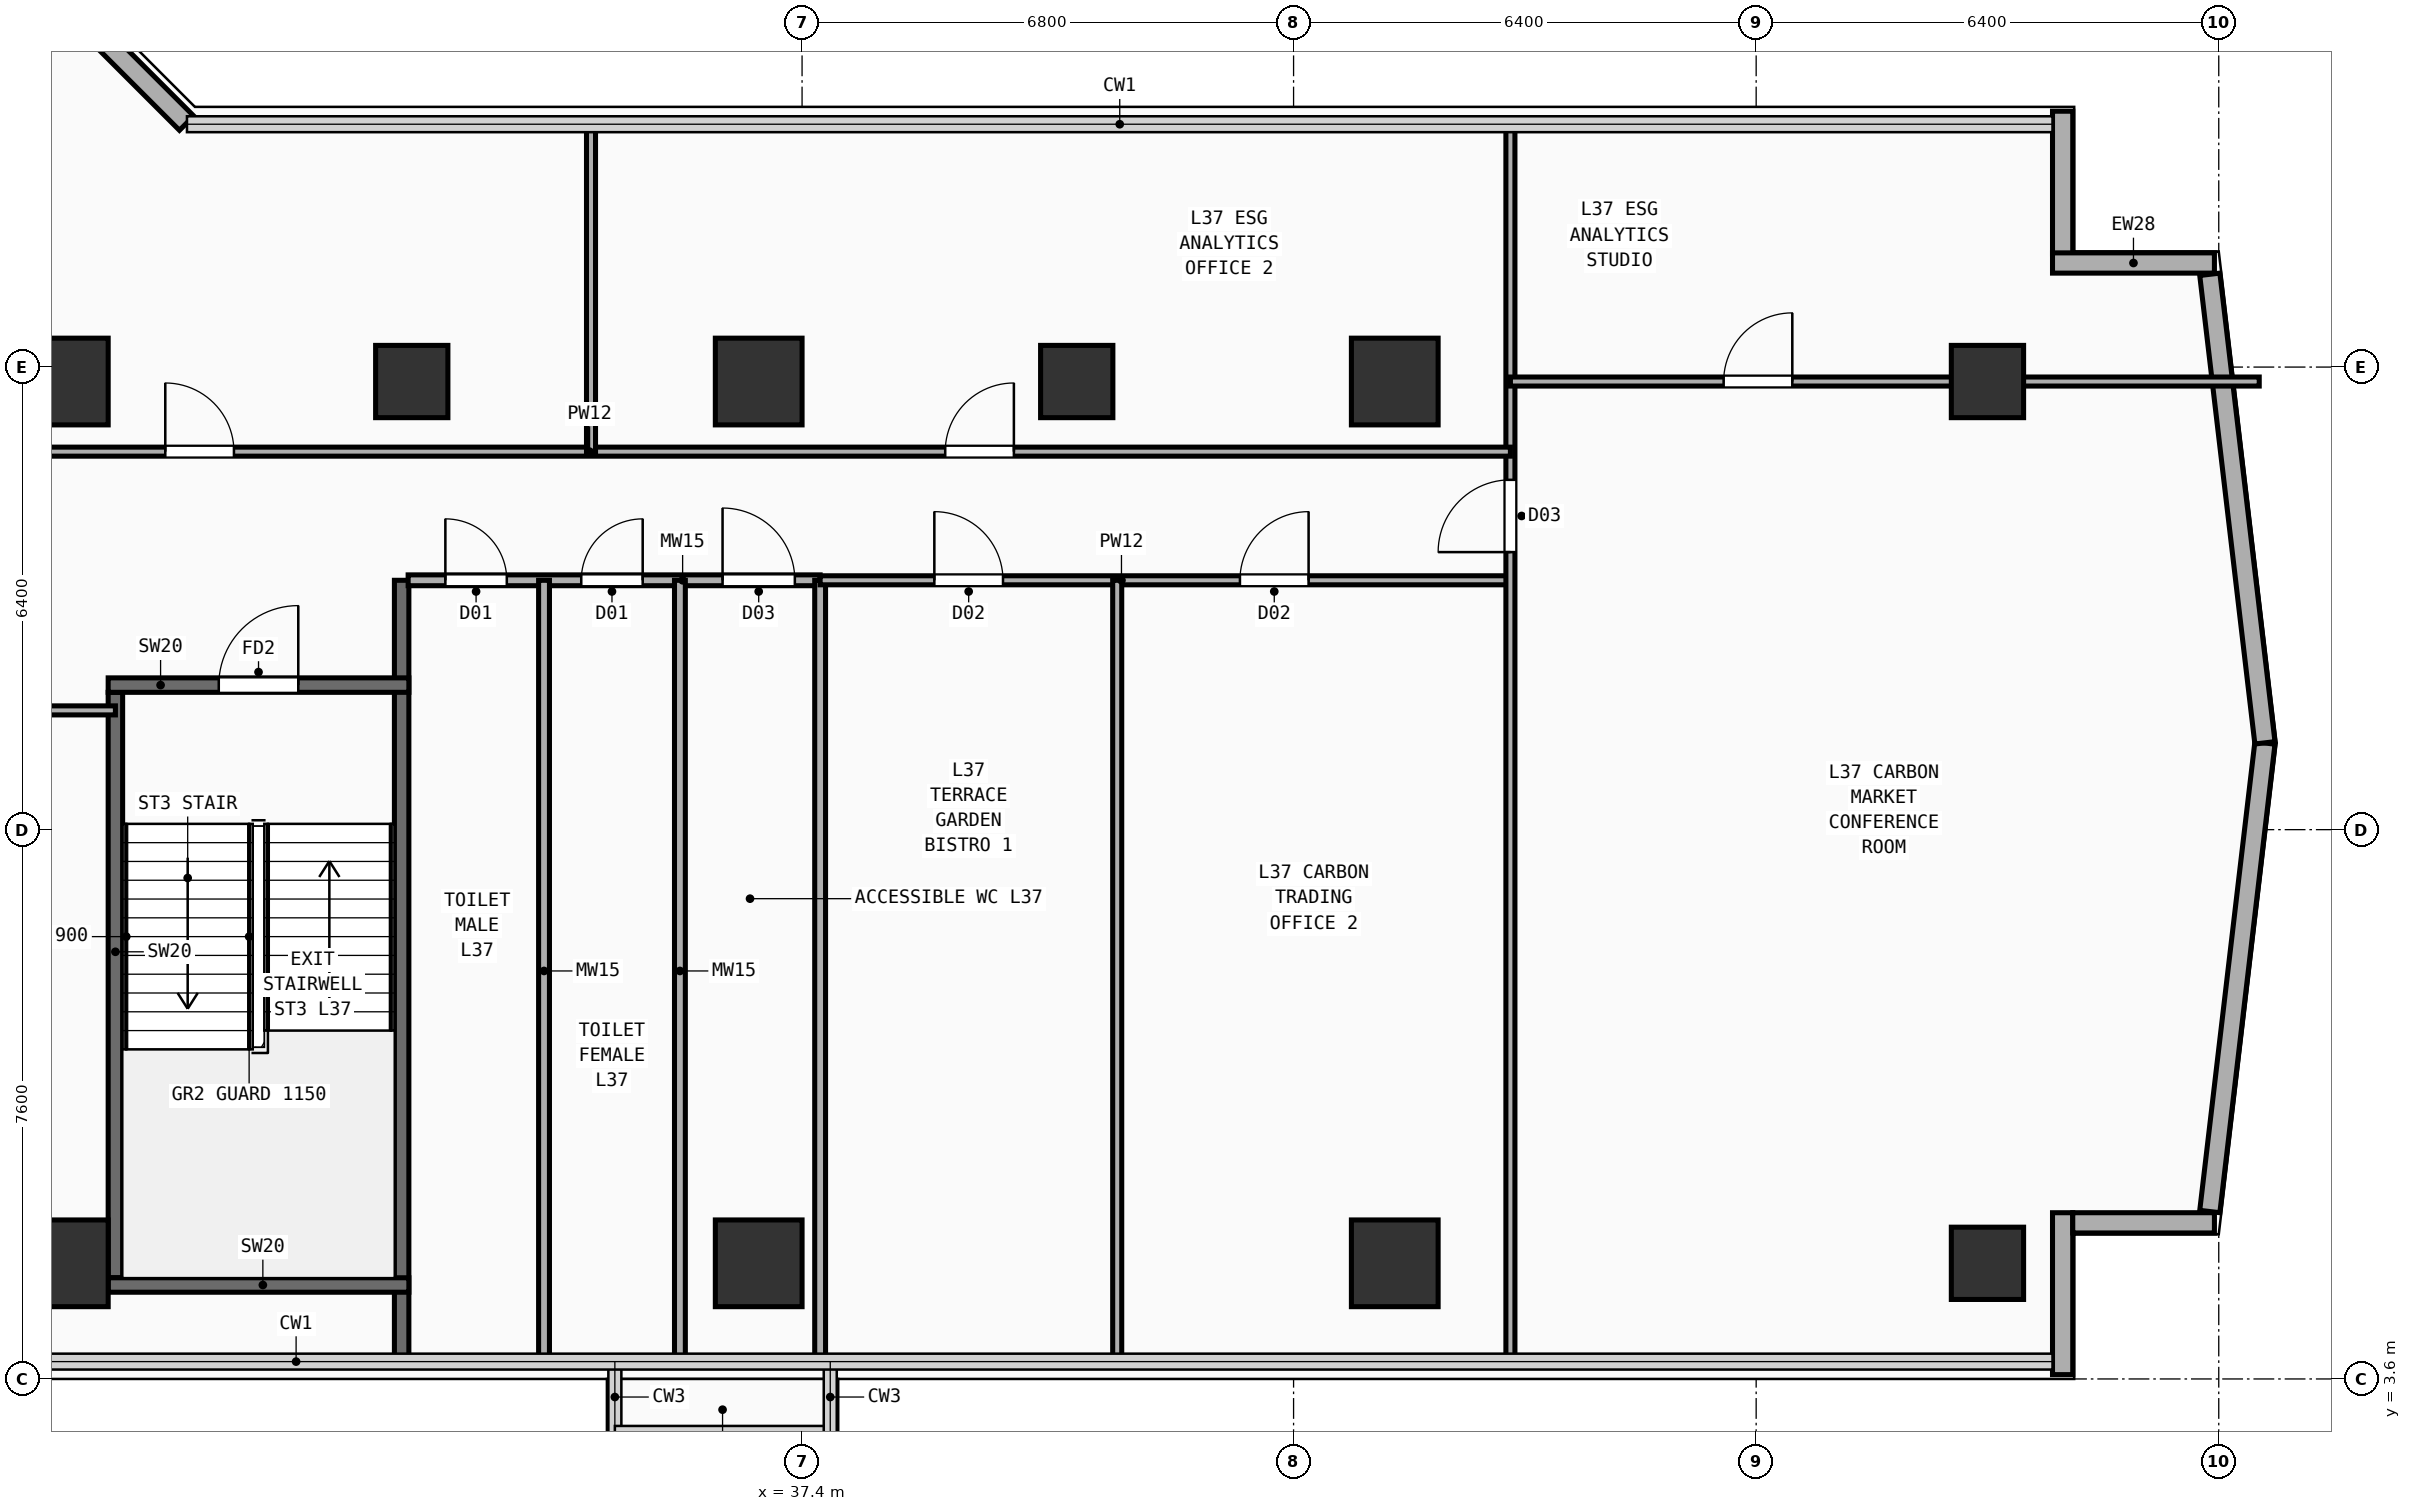
"""IFC4 building model, lengths in metres.
Left out: names, types, materials, properties, quantities, classifications, styles, units other than length and angle.
Written with IfcOpenShell. Run it as: python <this file> out.ifc"""

import sys

from ifc_helpers import new_model, si_unit, direction, frame, frame_2d, origin, origin_2d, place, context, subcontext, project, spatial, rectangle, extrude, element, fill, save


model = new_model("IFC4")
c1 = context("Model", 3, precision=1e-05, world=origin(), true_north=direction((0.0, 1.0)))
c2 = subcontext(c1, "Body", "Model", "MODEL_VIEW")
j1 = project(units=[si_unit("LENGTHUNIT", "METRE"), si_unit("PLANEANGLEUNIT", "RADIAN")], contexts=[c1])
p1 = place(None, origin())
s1 = spatial("IfcSite", under=j1, at=p1, CompositionType="ELEMENT")
p2 = place(p1, origin())
s2 = spatial("IfcBuilding", under=s1, at=p2, CompositionType="ELEMENT")
p3 = place(p2, frame((0.0, 0.0, 146.2)))
s3 = spatial("IfcBuildingStorey", under=s2, at=p3, CompositionType="ELEMENT", Elevation=146.2)
for number, where, z_axis, x_axis in (
    (1, (27.2, 5.2, 0.0), (0.0, 0.0, 1.0), (1.0, 0.0, 0.0)),
    (2, (36.8, 5.2, 0.0), (0.0, 0.0, 1.0), (1.0, 0.0, 0.0)),
    (3, (45.6, 5.2, 0.0), (0.0, 0.0, 1.0), (1.0, 0.0, 0.0)),
    (4, (27.2, 17.4, 0.0), (0.0, 0.0, 1.0), (1.0, 0.0, 0.0)),
    (5, (36.8, 17.4, 0.0), (0.0, 0.0, 1.0), (1.0, 0.0, 0.0)),
    (6, (45.6, 17.4, 0.0), (0.0, 0.0, 1.0), (1.0, 0.0, 0.0)),
):
    element("IfcColumn", number, at=place(p3, frame(where, z_axis=z_axis, x_axis=x_axis)), inside=s3, PredefinedType="COLUMN", context=c2, shape_type="SweptSolid", body=[
        extrude(rectangle(XDim=1.2, YDim=1.2, at=origin_2d()), origin(), (0.0, 0.0, 1.0), 3.56),
    ])
for number, where, z_axis, x_axis in (
    (7, (53.8, 5.2, 0.0), (0.0, 0.0, 1.0), (1.0, 0.0, 0.0)),
    (8, (53.8, 17.4, 0.0), (0.0, 0.0, 1.0), (1.0, 0.0, 0.0)),
    (9, (32.0, 17.4, 0.0), (0.0, 0.0, 1.0), (1.0, 0.0, 0.0)),
    (10, (41.2, 17.4, 0.0), (0.0, 0.0, 1.0), (1.0, 0.0, 0.0)),
):
    element("IfcColumn", number, at=place(p3, frame(where, z_axis=z_axis, x_axis=x_axis)), inside=s3, PredefinedType="COLUMN", context=c2, shape_type="SweptSolid", body=[
        extrude(rectangle(XDim=1.0, YDim=1.0, at=origin_2d()), origin(), (0.0, 0.0, 1.0), 3.56),
    ])
p4 = place(p3, frame((54.84, 3.66, 0.0), z_axis=(0.0, 0.0, 1.0), x_axis=(0.0, 1.0, 0.0)))
e11 = element("IfcWall", 11, at=p4, inside=s3, PredefinedType="SOLIDWALL", context=c2, shape_type="SweptSolid", body=[
    extrude(rectangle(XDim=2.24, YDim=0.28, at=frame_2d((1.12, 0.0))), origin(), (0.0, 0.0, 1.0), 3.56),
])
p5 = place(p3, frame((54.98, 5.76, 0.0), z_axis=(0.0, 0.0, 1.0), x_axis=(1.0, 0.0, 0.0)))
e12 = element("IfcWall", 12, at=p5, inside=s3, PredefinedType="SOLIDWALL", context=c2, shape_type="SweptSolid", body=[
    extrude(rectangle(XDim=1.96, YDim=0.28, at=frame_2d((0.98, 0.0))), origin(), (0.0, 0.0, 1.0), 3.56),
])
p6 = place(p3, frame((54.84, 19.165, 0.0), z_axis=(0.0, 0.0, 1.0), x_axis=(0.0, 1.0, 0.0)))
e13 = element("IfcWall", 13, at=p6, inside=s3, PredefinedType="SOLIDWALL", context=c2, shape_type="SweptSolid", body=[
    extrude(rectangle(XDim=1.975, YDim=0.28, at=frame_2d((0.987, 0.0))), origin(), (0.0, 0.0, 1.0), 3.56),
])
p7 = place(p3, frame((54.7, 19.04, 0.0), z_axis=(0.0, 0.0, 1.0), x_axis=(1.0, 0.0, 0.0)))
e14 = element("IfcWall", 14, at=p7, inside=s3, PredefinedType="SOLIDWALL", context=c2, shape_type="SweptSolid", body=[
    extrude(rectangle(XDim=2.24, YDim=0.28, at=frame_2d((1.12, 0.0))), origin(), (0.0, 0.0, 1.0), 3.56),
])
p8 = place(p3, frame((28.885, 20.975, 0.0), z_axis=(0.0, 0.0, 1.0), x_axis=(-0.707106781187, 0.707106781187, 0.0)))
e15 = element("IfcWall", 15, at=p8, inside=s3, PredefinedType="SOLIDWALL", context=c2, shape_type="SweptSolid", body=[
    extrude(rectangle(XDim=9.207, YDim=0.28, at=frame_2d((4.603, 0.0))), origin(), (0.0, 0.0, 1.0), 3.56),
])
for number, where, z_axis, x_axis in (
    (16, (56.876, 5.917, 0.0), (0.0, 0.0, 1.0), (0.117, 0.993, 0.0)),
    (17, (57.639, 12.401, 0.0), (0.0, 0.0, 1.0), (-0.117, 0.993, 0.0)),
):
    element("IfcWall", number, at=place(p3, frame(where, z_axis=z_axis, x_axis=x_axis)), inside=s3, PredefinedType="SOLIDWALL", context=c2, shape_type="SweptSolid", body=[
        extrude(rectangle(XDim=6.527, YDim=0.28, at=frame_2d((3.263, 0.0))), origin(), (0.0, 0.0, 1.0), 3.56),
    ])
p9 = place(p3, frame((27.9, 5.0, 0.0), z_axis=(0.0, 0.0, 1.0), x_axis=(0.0, 1.0, 0.0)))
e18 = element("IfcWall", 18, at=p9, inside=s3, PredefinedType="SHEAR", context=c2, shape_type="SweptSolid", body=[
    extrude(rectangle(XDim=8.1, YDim=0.2, at=frame_2d((4.05, 0.0))), origin(), (0.0, 0.0, 1.0), 3.56),
])
p10 = place(p3, frame((31.86, 3.84, 0.0), z_axis=(0.0, 0.0, 1.0), x_axis=(0.0, 1.0, 0.0)))
e19 = element("IfcWall", 19, at=p10, inside=s3, PredefinedType="SHEAR", context=c2, shape_type="SweptSolid", body=[
    extrude(rectangle(XDim=10.81, YDim=0.2, at=frame_2d((5.405, 0.0))), origin(), (0.0, 0.0, 1.0), 3.56),
])
p11 = place(p3, frame((27.8, 4.9, 0.0), z_axis=(0.0, 0.0, 1.0), x_axis=(1.0, 0.0, 0.0)))
e20 = element("IfcWall", 20, at=p11, inside=s3, PredefinedType="SHEAR", context=c2, shape_type="SweptSolid", body=[
    extrude(rectangle(XDim=4.16, YDim=0.2, at=frame_2d((2.08, 0.0))), origin(), (0.0, 0.0, 1.0), 3.56),
])
p12 = place(p3, frame((27.8, 13.2, 0.0), z_axis=(0.0, 0.0, 1.0), x_axis=(1.0, 0.0, 0.0)))
e21 = element("IfcWall", 21, at=p12, inside=s3, PredefinedType="SHEAR", context=c2, shape_type="SweptSolid", body=[
    extrude(rectangle(XDim=4.16, YDim=0.2, at=frame_2d((2.08, 0.0))), origin(), (0.0, 0.0, 1.0), 3.56),
])
p13 = place(p12, frame((1.53, 0.0, 0.0)))
e22 = element("IfcOpeningElement", 22, at=p13, cuts=e21, PredefinedType="OPENING", context=c2, shape_type="SweptSolid", body=[
    extrude(rectangle(XDim=1.1, YDim=2.2, at=frame_2d((0.55, 1.1))), frame((0.0, 0.11, 0.0), z_axis=(0.0, -1.0, 0.0), x_axis=(1.0, 0.0, 0.0)), (0.0, 0.0, 1.0), 0.22),
])
p14 = place(p3, frame((31.95, 14.65, 0.0), z_axis=(0.0, 0.0, 1.0), x_axis=(1.0, 0.0, 0.0)))
e23 = element("IfcWall", 23, at=p14, inside=s3, PredefinedType="PLUMBINGWALL", context=c2, shape_type="SweptSolid", body=[
    extrude(rectangle(XDim=5.7, YDim=0.15, at=frame_2d((2.85, 0.0))), origin(), (0.0, 0.0, 1.0), 3.56),
])
p15 = place(p14, frame((0.515, 0.0, 0.0)))
e24 = element("IfcOpeningElement", 24, at=p15, cuts=e23, PredefinedType="OPENING", context=c2, shape_type="SweptSolid", body=[
    extrude(rectangle(XDim=0.85, YDim=2.15, at=frame_2d((0.425, 1.075))), frame((0.0, 0.085, 0.0), z_axis=(0.0, -1.0, 0.0), x_axis=(1.0, 0.0, 0.0)), (0.0, 0.0, 1.0), 0.17),
])
p16 = place(p14, frame((2.395, 0.0, 0.0)))
e25 = element("IfcOpeningElement", 25, at=p16, cuts=e23, PredefinedType="OPENING", context=c2, shape_type="SweptSolid", body=[
    extrude(rectangle(XDim=0.85, YDim=2.15, at=frame_2d((0.425, 1.075))), frame((0.0, 0.085, 0.0), z_axis=(0.0, -1.0, 0.0), x_axis=(1.0, 0.0, 0.0)), (0.0, 0.0, 1.0), 0.17),
])
p17 = place(p14, frame((4.35, 0.0, 0.0)))
e26 = element("IfcOpeningElement", 26, at=p17, cuts=e23, PredefinedType="OPENING", context=c2, shape_type="SweptSolid", body=[
    extrude(rectangle(XDim=1.0, YDim=2.2, at=frame_2d((0.5, 1.1))), frame((0.0, 0.085, 0.0), z_axis=(0.0, -1.0, 0.0), x_axis=(1.0, 0.0, 0.0)), (0.0, 0.0, 1.0), 0.17),
])
for number, where, z_axis, x_axis in (
    (27, (33.83, 3.84, 0.0), (0.0, 0.0, 1.0), (0.0, 1.0, 0.0)),
    (28, (35.71, 3.84, 0.0), (0.0, 0.0, 1.0), (0.0, 1.0, 0.0)),
    (29, (37.65, 3.84, 0.0), (0.0, 0.0, 1.0), (0.0, 1.0, 0.0)),
):
    element("IfcWall", number, at=place(p3, frame(where, z_axis=z_axis, x_axis=x_axis)), inside=s3, PredefinedType="PLUMBINGWALL", context=c2, shape_type="SweptSolid", body=[
        extrude(rectangle(XDim=10.81, YDim=0.15, at=frame_2d((5.405, 0.0))), origin(), (0.0, 0.0, 1.0), 3.56),
    ])
p18 = place(p3, frame((20.85, 12.85, 0.0), z_axis=(0.0, 0.0, 1.0), x_axis=(1.0, 0.0, 0.0)))
e30 = element("IfcWall", 30, at=p18, inside=s3, PredefinedType="PARTITIONING", context=c2, shape_type="SweptSolid", body=[
    extrude(rectangle(XDim=7.05, YDim=0.125, at=frame_2d((3.525, 0.0))), origin(), (0.0, 0.0, 1.0), 3.56),
])
p19 = place(p18, frame((2.8, 0.0, 0.0)))
e31 = element("IfcOpeningElement", 31, at=p19, cuts=e30, PredefinedType="OPENING", context=c2, shape_type="SweptSolid", body=[
    extrude(rectangle(XDim=0.95, YDim=2.15, at=frame_2d((0.475, 1.075))), frame((0.0, 0.073, 0.0), z_axis=(0.0, -1.0, 0.0), x_axis=(1.0, 0.0, 0.0)), (0.0, 0.0, 1.0), 0.145),
])
p20 = place(p3, frame((37.65, 14.65, 0.0), z_axis=(0.0, 0.0, 1.0), x_axis=(1.0, 0.0, 0.0)))
e32 = element("IfcWall", 32, at=p20, inside=s3, PredefinedType="PARTITIONING", context=c2, shape_type="SweptSolid", body=[
    extrude(rectangle(XDim=9.55, YDim=0.125, at=frame_2d((4.775, 0.0))), origin(), (0.0, 0.0, 1.0), 3.56),
])
p21 = place(p20, frame((1.58, 0.0, 0.0)))
e33 = element("IfcOpeningElement", 33, at=p21, cuts=e32, PredefinedType="OPENING", context=c2, shape_type="SweptSolid", body=[
    extrude(rectangle(XDim=0.95, YDim=2.15, at=frame_2d((0.475, 1.075))), frame((0.0, 0.073, 0.0), z_axis=(0.0, -1.0, 0.0), x_axis=(1.0, 0.0, 0.0)), (0.0, 0.0, 1.0), 0.145),
])
p22 = place(p20, frame((5.808, 0.0, 0.0)))
e34 = element("IfcOpeningElement", 34, at=p22, cuts=e32, PredefinedType="OPENING", context=c2, shape_type="SweptSolid", body=[
    extrude(rectangle(XDim=0.95, YDim=2.15, at=frame_2d((0.475, 1.075))), frame((0.0, 0.073, 0.0), z_axis=(0.0, -1.0, 0.0), x_axis=(1.0, 0.0, 0.0)), (0.0, 0.0, 1.0), 0.145),
])
p23 = place(p3, frame((41.76, 3.84, 0.0), z_axis=(0.0, 0.0, 1.0), x_axis=(0.0, 1.0, 0.0)))
e35 = element("IfcWall", 35, at=p23, inside=s3, PredefinedType="PARTITIONING", context=c2, shape_type="SweptSolid", body=[
    extrude(rectangle(XDim=10.81, YDim=0.125, at=frame_2d((5.405, 0.0))), origin(), (0.0, 0.0, 1.0), 3.56),
])
p24 = place(p3, frame((47.2, 3.84, 0.0), z_axis=(0.0, 0.0, 1.0), x_axis=(0.0, 1.0, 0.0)))
e36 = element("IfcWall", 36, at=p24, inside=s3, PredefinedType="PARTITIONING", context=c2, shape_type="SweptSolid", body=[
    extrude(rectangle(XDim=17.12, YDim=0.125, at=frame_2d((8.56, 0.0))), origin(), (0.0, 0.0, 1.0), 3.56),
])
p25 = place(p24, frame((11.2, 0.0, 0.0)))
e37 = element("IfcOpeningElement", 37, at=p25, cuts=e36, PredefinedType="OPENING", context=c2, shape_type="SweptSolid", body=[
    extrude(rectangle(XDim=1.0, YDim=2.2, at=frame_2d((0.5, 1.1))), frame((0.0, 0.073, 0.0), z_axis=(0.0, -1.0, 0.0), x_axis=(1.0, 0.0, 0.0)), (0.0, 0.0, 1.0), 0.145),
])
p26 = place(p3, frame((47.2, 17.4, 0.0), z_axis=(0.0, 0.0, 1.0), x_axis=(1.0, 0.0, 0.0)))
e38 = element("IfcWall", 38, at=p26, inside=s3, PredefinedType="PARTITIONING", context=c2, shape_type="SweptSolid", body=[
    extrude(rectangle(XDim=10.36, YDim=0.125, at=frame_2d((5.18, 0.0))), origin(), (0.0, 0.0, 1.0), 3.2),
])
p27 = place(p26, frame((2.95, 0.0, 0.0)))
e39 = element("IfcOpeningElement", 39, at=p27, cuts=e38, PredefinedType="OPENING", context=c2, shape_type="SweptSolid", body=[
    extrude(rectangle(XDim=0.95, YDim=2.15, at=frame_2d((0.475, 1.075))), frame((0.0, 0.073, 0.0), z_axis=(0.0, -1.0, 0.0), x_axis=(1.0, 0.0, 0.0)), (0.0, 0.0, 1.0), 0.145),
])
p28 = place(p3, frame((23.65, 16.43, 0.0), z_axis=(0.0, 0.0, 1.0), x_axis=(1.0, 0.0, 0.0)))
e40 = element("IfcWall", 40, at=p28, inside=s3, PredefinedType="PARTITIONING", context=c2, shape_type="SweptSolid", body=[
    extrude(rectangle(XDim=23.55, YDim=0.125, at=frame_2d((11.775, 0.0))), origin(), (0.0, 0.0, 1.0), 3.56),
])
p29 = place(p28, frame((4.94, 0.0, 0.0)))
e41 = element("IfcOpeningElement", 41, at=p29, cuts=e40, PredefinedType="OPENING", context=c2, shape_type="SweptSolid", body=[
    extrude(rectangle(XDim=0.95, YDim=2.15, at=frame_2d((0.475, 1.075))), frame((0.0, 0.073, 0.0), z_axis=(0.0, -1.0, 0.0), x_axis=(1.0, 0.0, 0.0)), (0.0, 0.0, 1.0), 0.145),
])
p30 = place(p28, frame((15.73, 0.0, 0.0)))
e42 = element("IfcOpeningElement", 42, at=p30, cuts=e40, PredefinedType="OPENING", context=c2, shape_type="SweptSolid", body=[
    extrude(rectangle(XDim=0.95, YDim=2.15, at=frame_2d((0.475, 1.075))), frame((0.0, 0.073, 0.0), z_axis=(0.0, -1.0, 0.0), x_axis=(1.0, 0.0, 0.0)), (0.0, 0.0, 1.0), 0.145),
])
p31 = place(p3, frame((34.48, 16.43, 0.0), z_axis=(0.0, 0.0, 1.0), x_axis=(0.0, 1.0, 0.0)))
e43 = element("IfcWall", 43, at=p31, inside=s3, PredefinedType="PARTITIONING", context=c2, shape_type="SweptSolid", body=[
    extrude(rectangle(XDim=4.53, YDim=0.125, at=frame_2d((2.265, 0.0))), origin(), (0.0, 0.0, 1.0), 3.56),
])
p32 = place(p13, frame((1.1, 0.0, 0.0), z_axis=(0.0, 0.0, 1.0), x_axis=(-1.0, 0.0, 0.0)))
e44 = element("IfcDoor", 44, at=p32, inside=s3, OperationType="SINGLE_SWING_LEFT", PredefinedType="DOOR", context=c2, shape_type="SweptSolid", body=[
    extrude(rectangle(XDim=1.1, YDim=2.2, at=frame_2d((0.55, 1.1))), frame((0.0, 0.025, 0.0), z_axis=(0.0, -1.0, 0.0), x_axis=(1.0, 0.0, 0.0)), (0.0, 0.0, 1.0), 0.05),
])
fill(e22, e44)
p33 = place(p15, origin())
e45 = element("IfcDoor", 45, at=p33, inside=s3, OperationType="SINGLE_SWING_LEFT", PredefinedType="DOOR", context=c2, shape_type="SweptSolid", body=[
    extrude(rectangle(XDim=0.85, YDim=2.15, at=frame_2d((0.425, 1.075))), frame((0.0, 0.025, 0.0), z_axis=(0.0, -1.0, 0.0), x_axis=(1.0, 0.0, 0.0)), (0.0, 0.0, 1.0), 0.05),
])
fill(e24, e45)
p34 = place(p16, origin())
e46 = element("IfcDoor", 46, at=p34, inside=s3, OperationType="SINGLE_SWING_RIGHT", PredefinedType="DOOR", context=c2, shape_type="SweptSolid", body=[
    extrude(rectangle(XDim=0.85, YDim=2.15, at=frame_2d((0.425, 1.075))), frame((0.0, 0.025, 0.0), z_axis=(0.0, -1.0, 0.0), x_axis=(1.0, 0.0, 0.0)), (0.0, 0.0, 1.0), 0.05),
])
fill(e25, e46)
p35 = place(p17, origin())
e47 = element("IfcDoor", 47, at=p35, inside=s3, OperationType="SINGLE_SWING_LEFT", PredefinedType="DOOR", context=c2, shape_type="SweptSolid", body=[
    extrude(rectangle(XDim=1.0, YDim=2.2, at=frame_2d((0.5, 1.1))), frame((0.0, 0.025, 0.0), z_axis=(0.0, -1.0, 0.0), x_axis=(1.0, 0.0, 0.0)), (0.0, 0.0, 1.0), 0.05),
])
fill(e26, e47)
p36 = place(p21, origin())
e48 = element("IfcDoor", 48, at=p36, inside=s3, OperationType="SINGLE_SWING_LEFT", PredefinedType="DOOR", context=c2, shape_type="SweptSolid", body=[
    extrude(rectangle(XDim=0.95, YDim=2.15, at=frame_2d((0.475, 1.075))), frame((0.0, 0.025, 0.0), z_axis=(0.0, -1.0, 0.0), x_axis=(1.0, 0.0, 0.0)), (0.0, 0.0, 1.0), 0.05),
])
fill(e33, e48)
p37 = place(p22, origin())
e49 = element("IfcDoor", 49, at=p37, inside=s3, OperationType="SINGLE_SWING_RIGHT", PredefinedType="DOOR", context=c2, shape_type="SweptSolid", body=[
    extrude(rectangle(XDim=0.95, YDim=2.15, at=frame_2d((0.475, 1.075))), frame((0.0, 0.025, 0.0), z_axis=(0.0, -1.0, 0.0), x_axis=(1.0, 0.0, 0.0)), (0.0, 0.0, 1.0), 0.05),
])
fill(e34, e49)
p38 = place(p25, origin())
e50 = element("IfcDoor", 50, at=p38, inside=s3, OperationType="SINGLE_SWING_LEFT", PredefinedType="DOOR", context=c2, shape_type="SweptSolid", body=[
    extrude(rectangle(XDim=1.0, YDim=2.2, at=frame_2d((0.5, 1.1))), frame((0.0, 0.025, 0.0), z_axis=(0.0, -1.0, 0.0), x_axis=(1.0, 0.0, 0.0)), (0.0, 0.0, 1.0), 0.05),
])
fill(e37, e50)
p39 = place(p27, origin())
e51 = element("IfcDoor", 51, at=p39, inside=s3, OperationType="SINGLE_SWING_RIGHT", PredefinedType="DOOR", context=c2, shape_type="SweptSolid", body=[
    extrude(rectangle(XDim=0.95, YDim=2.15, at=frame_2d((0.475, 1.075))), frame((0.0, 0.025, 0.0), z_axis=(0.0, -1.0, 0.0), x_axis=(1.0, 0.0, 0.0)), (0.0, 0.0, 1.0), 0.05),
])
fill(e39, e51)
p40 = place(p29, origin())
e52 = element("IfcDoor", 52, at=p40, inside=s3, OperationType="SINGLE_SWING_LEFT", PredefinedType="DOOR", context=c2, shape_type="SweptSolid", body=[
    extrude(rectangle(XDim=0.95, YDim=2.15, at=frame_2d((0.475, 1.075))), frame((0.0, 0.025, 0.0), z_axis=(0.0, -1.0, 0.0), x_axis=(1.0, 0.0, 0.0)), (0.0, 0.0, 1.0), 0.05),
])
fill(e41, e52)
p41 = place(p30, origin())
e53 = element("IfcDoor", 53, at=p41, inside=s3, OperationType="SINGLE_SWING_RIGHT", PredefinedType="DOOR", context=c2, shape_type="SweptSolid", body=[
    extrude(rectangle(XDim=0.95, YDim=2.15, at=frame_2d((0.475, 1.075))), frame((0.0, 0.025, 0.0), z_axis=(0.0, -1.0, 0.0), x_axis=(1.0, 0.0, 0.0)), (0.0, 0.0, 1.0), 0.05),
])
fill(e42, e53)
save(model, sys.argv[1])
